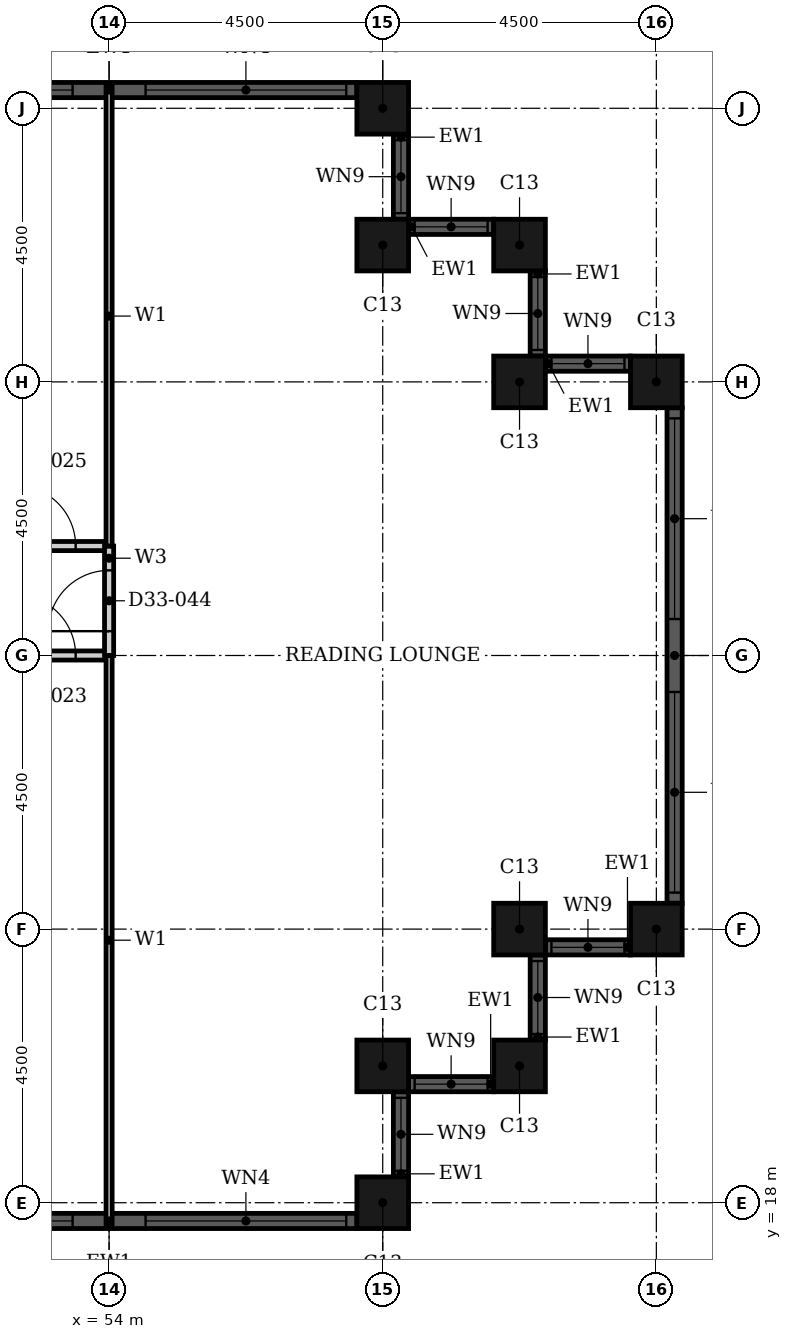
"""IFC4 building model, lengths in metres.
Left out: names, types, materials, properties, quantities, classifications, styles, units other than length and angle.
Written with IfcOpenShell. Run it as: python <this file> out.ifc"""

import sys

from ifc_helpers import new_model, si_unit, direction, frame, frame_2d, origin, origin_2d, place, context, subcontext, project, spatial, rectangle, hollow_rectangle, extrude, element, fill, save


model = new_model("IFC4")
c1 = context("Model", 3, precision=1e-05, world=origin(), true_north=direction((0.0, 1.0)))
c2 = subcontext(c1, "Body", "Model", "MODEL_VIEW")
j1 = project(units=[si_unit("LENGTHUNIT", "METRE"), si_unit("PLANEANGLEUNIT", "RADIAN")], contexts=[c1])
p1 = place(None, origin())
s1 = spatial("IfcSite", under=j1, at=p1, CompositionType="ELEMENT")
p2 = place(p1, origin())
s2 = spatial("IfcBuilding", under=s1, at=p2, CompositionType="ELEMENT")
p3 = place(p2, frame((0.0, 0.0, 133.2)))
s3 = spatial("IfcBuildingStorey", under=s2, at=p3, CompositionType="ELEMENT", Elevation=133.2)
for number, where, z_axis, x_axis in (
    (1, (58.5, 18.0, 0.0), (0.0, 0.0, 1.0), (1.0, 0.0, 0.0)),
    (2, (58.5, 20.25, 0.0), (0.0, 0.0, 1.0), (1.0, 0.0, 0.0)),
    (3, (60.75, 20.25, 0.0), (0.0, 0.0, 1.0), (1.0, 0.0, 0.0)),
    (4, (60.75, 22.5, 0.0), (0.0, 0.0, 1.0), (1.0, 0.0, 0.0)),
    (5, (63.0, 22.5, 0.0), (0.0, 0.0, 1.0), (1.0, 0.0, 0.0)),
    (6, (63.0, 31.5, 0.0), (0.0, 0.0, 1.0), (1.0, 0.0, 0.0)),
    (7, (60.75, 31.5, 0.0), (0.0, 0.0, 1.0), (1.0, 0.0, 0.0)),
    (8, (60.75, 33.75, 0.0), (0.0, 0.0, 1.0), (1.0, 0.0, 0.0)),
    (9, (58.5, 33.75, 0.0), (0.0, 0.0, 1.0), (1.0, 0.0, 0.0)),
    (10, (58.5, 36.0, 0.0), (0.0, 0.0, 1.0), (1.0, 0.0, 0.0)),
):
    element("IfcColumn", number, at=place(p3, frame(where, z_axis=z_axis, x_axis=x_axis)), inside=s3, PredefinedType="COLUMN", context=c2, shape_type="SweptSolid", body=[
        extrude(hollow_rectangle(XDim=0.85, YDim=0.85, WallThickness=0.026, at=origin_2d()), origin(), (0.0, 0.0, 1.0), 3.6),
    ])
p4 = place(p3, frame((49.925, 17.7, 0.0), z_axis=(0.0, 0.0, 1.0), x_axis=(1.0, 0.0, 0.0)))
e11 = element("IfcWall", 11, at=p4, inside=s3, PredefinedType="SOLIDWALL", context=c2, shape_type="SweptSolid", body=[
    extrude(rectangle(XDim=8.15, YDim=0.25, at=frame_2d((4.075, 0.0))), origin(), (0.0, 0.0, 1.0), 3.6),
])
p5 = place(p4, frame((0.175, 0.0, 0.9)))
e12 = element("IfcOpeningElement", 12, at=p5, cuts=e11, PredefinedType="OPENING", context=c2, shape_type="SweptSolid", body=[
    extrude(rectangle(XDim=3.3, YDim=2.08, at=frame_2d((1.65, 1.04))), frame((0.0, 0.135, 0.0), z_axis=(0.0, -1.0, 0.0), x_axis=(1.0, 0.0, 0.0)), (0.0, 0.0, 1.0), 0.27),
])
p6 = place(p4, frame((4.675, 0.0, 0.9)))
e13 = element("IfcOpeningElement", 13, at=p6, cuts=e11, PredefinedType="OPENING", context=c2, shape_type="SweptSolid", body=[
    extrude(rectangle(XDim=3.3, YDim=2.08, at=frame_2d((1.65, 1.04))), frame((0.0, 0.135, 0.0), z_axis=(0.0, -1.0, 0.0), x_axis=(1.0, 0.0, 0.0)), (0.0, 0.0, 1.0), 0.27),
])
p7 = place(p3, frame((58.8, 18.425, 0.0), z_axis=(0.0, 0.0, 1.0), x_axis=(0.0, 1.0, 0.0)))
e14 = element("IfcWall", 14, at=p7, inside=s3, PredefinedType="SOLIDWALL", context=c2, shape_type="SweptSolid", body=[
    extrude(rectangle(XDim=1.4, YDim=0.25, at=frame_2d((0.7, 0.0))), origin(), (0.0, 0.0, 1.0), 3.6),
])
p8 = place(p7, frame((0.1, 0.0, 0.9)))
e15 = element("IfcOpeningElement", 15, at=p8, cuts=e14, PredefinedType="OPENING", context=c2, shape_type="SweptSolid", body=[
    extrude(rectangle(XDim=1.2, YDim=2.08, at=frame_2d((0.6, 1.04))), frame((0.0, 0.135, 0.0), z_axis=(0.0, -1.0, 0.0), x_axis=(1.0, 0.0, 0.0)), (0.0, 0.0, 1.0), 0.27),
])
p9 = place(p3, frame((58.925, 19.95, 0.0), z_axis=(0.0, 0.0, 1.0), x_axis=(1.0, 0.0, 0.0)))
e16 = element("IfcWall", 16, at=p9, inside=s3, PredefinedType="SOLIDWALL", context=c2, shape_type="SweptSolid", body=[
    extrude(rectangle(XDim=1.4, YDim=0.25, at=frame_2d((0.7, 0.0))), origin(), (0.0, 0.0, 1.0), 3.6),
])
p10 = place(p9, frame((0.1, 0.0, 0.9)))
e17 = element("IfcOpeningElement", 17, at=p10, cuts=e16, PredefinedType="OPENING", context=c2, shape_type="SweptSolid", body=[
    extrude(rectangle(XDim=1.2, YDim=2.08, at=frame_2d((0.6, 1.04))), frame((0.0, 0.135, 0.0), z_axis=(0.0, -1.0, 0.0), x_axis=(1.0, 0.0, 0.0)), (0.0, 0.0, 1.0), 0.27),
])
p11 = place(p3, frame((61.05, 20.675, 0.0), z_axis=(0.0, 0.0, 1.0), x_axis=(0.0, 1.0, 0.0)))
e18 = element("IfcWall", 18, at=p11, inside=s3, PredefinedType="SOLIDWALL", context=c2, shape_type="SweptSolid", body=[
    extrude(rectangle(XDim=1.4, YDim=0.25, at=frame_2d((0.7, 0.0))), origin(), (0.0, 0.0, 1.0), 3.6),
])
p12 = place(p11, frame((0.1, 0.0, 0.9)))
e19 = element("IfcOpeningElement", 19, at=p12, cuts=e18, PredefinedType="OPENING", context=c2, shape_type="SweptSolid", body=[
    extrude(rectangle(XDim=1.2, YDim=2.08, at=frame_2d((0.6, 1.04))), frame((0.0, 0.135, 0.0), z_axis=(0.0, -1.0, 0.0), x_axis=(1.0, 0.0, 0.0)), (0.0, 0.0, 1.0), 0.27),
])
p13 = place(p3, frame((61.175, 22.2, 0.0), z_axis=(0.0, 0.0, 1.0), x_axis=(1.0, 0.0, 0.0)))
e20 = element("IfcWall", 20, at=p13, inside=s3, PredefinedType="SOLIDWALL", context=c2, shape_type="SweptSolid", body=[
    extrude(rectangle(XDim=1.4, YDim=0.25, at=frame_2d((0.7, 0.0))), origin(), (0.0, 0.0, 1.0), 3.6),
])
p14 = place(p13, frame((0.1, 0.0, 0.9)))
e21 = element("IfcOpeningElement", 21, at=p14, cuts=e20, PredefinedType="OPENING", context=c2, shape_type="SweptSolid", body=[
    extrude(rectangle(XDim=1.2, YDim=2.08, at=frame_2d((0.6, 1.04))), frame((0.0, 0.135, 0.0), z_axis=(0.0, -1.0, 0.0), x_axis=(1.0, 0.0, 0.0)), (0.0, 0.0, 1.0), 0.27),
])
p15 = place(p3, frame((63.3, 22.925, 0.0), z_axis=(0.0, 0.0, 1.0), x_axis=(0.0, 1.0, 0.0)))
e22 = element("IfcWall", 22, at=p15, inside=s3, PredefinedType="SOLIDWALL", context=c2, shape_type="SweptSolid", body=[
    extrude(rectangle(XDim=8.15, YDim=0.25, at=frame_2d((4.075, 0.0))), origin(), (0.0, 0.0, 1.0), 3.6),
])
p16 = place(p15, frame((0.175, 0.0, 0.9)))
e23 = element("IfcOpeningElement", 23, at=p16, cuts=e22, PredefinedType="OPENING", context=c2, shape_type="SweptSolid", body=[
    extrude(rectangle(XDim=3.3, YDim=2.08, at=frame_2d((1.65, 1.04))), frame((0.0, 0.135, 0.0), z_axis=(0.0, -1.0, 0.0), x_axis=(1.0, 0.0, 0.0)), (0.0, 0.0, 1.0), 0.27),
])
p17 = place(p15, frame((4.675, 0.0, 0.9)))
e24 = element("IfcOpeningElement", 24, at=p17, cuts=e22, PredefinedType="OPENING", context=c2, shape_type="SweptSolid", body=[
    extrude(rectangle(XDim=3.3, YDim=2.08, at=frame_2d((1.65, 1.04))), frame((0.0, 0.135, 0.0), z_axis=(0.0, -1.0, 0.0), x_axis=(1.0, 0.0, 0.0)), (0.0, 0.0, 1.0), 0.27),
])
p18 = place(p3, frame((62.575, 31.8, 0.0), z_axis=(0.0, 0.0, 1.0), x_axis=(-1.0, 0.0, 0.0)))
e25 = element("IfcWall", 25, at=p18, inside=s3, PredefinedType="SOLIDWALL", context=c2, shape_type="SweptSolid", body=[
    extrude(rectangle(XDim=1.4, YDim=0.25, at=frame_2d((0.7, 0.0))), origin(), (0.0, 0.0, 1.0), 3.6),
])
p19 = place(p18, frame((0.1, 0.0, 0.9)))
e26 = element("IfcOpeningElement", 26, at=p19, cuts=e25, PredefinedType="OPENING", context=c2, shape_type="SweptSolid", body=[
    extrude(rectangle(XDim=1.2, YDim=2.08, at=frame_2d((0.6, 1.04))), frame((0.0, 0.135, 0.0), z_axis=(0.0, -1.0, 0.0), x_axis=(1.0, 0.0, 0.0)), (0.0, 0.0, 1.0), 0.27),
])
p20 = place(p3, frame((61.05, 31.925, 0.0), z_axis=(0.0, 0.0, 1.0), x_axis=(0.0, 1.0, 0.0)))
e27 = element("IfcWall", 27, at=p20, inside=s3, PredefinedType="SOLIDWALL", context=c2, shape_type="SweptSolid", body=[
    extrude(rectangle(XDim=1.4, YDim=0.25, at=frame_2d((0.7, 0.0))), origin(), (0.0, 0.0, 1.0), 3.6),
])
p21 = place(p20, frame((0.1, 0.0, 0.9)))
e28 = element("IfcOpeningElement", 28, at=p21, cuts=e27, PredefinedType="OPENING", context=c2, shape_type="SweptSolid", body=[
    extrude(rectangle(XDim=1.2, YDim=2.08, at=frame_2d((0.6, 1.04))), frame((0.0, 0.135, 0.0), z_axis=(0.0, -1.0, 0.0), x_axis=(1.0, 0.0, 0.0)), (0.0, 0.0, 1.0), 0.27),
])
p22 = place(p3, frame((60.325, 34.05, 0.0), z_axis=(0.0, 0.0, 1.0), x_axis=(-1.0, 0.0, 0.0)))
e29 = element("IfcWall", 29, at=p22, inside=s3, PredefinedType="SOLIDWALL", context=c2, shape_type="SweptSolid", body=[
    extrude(rectangle(XDim=1.4, YDim=0.25, at=frame_2d((0.7, 0.0))), origin(), (0.0, 0.0, 1.0), 3.6),
])
p23 = place(p22, frame((0.1, 0.0, 0.9)))
e30 = element("IfcOpeningElement", 30, at=p23, cuts=e29, PredefinedType="OPENING", context=c2, shape_type="SweptSolid", body=[
    extrude(rectangle(XDim=1.2, YDim=2.08, at=frame_2d((0.6, 1.04))), frame((0.0, 0.135, 0.0), z_axis=(0.0, -1.0, 0.0), x_axis=(1.0, 0.0, 0.0)), (0.0, 0.0, 1.0), 0.27),
])
p24 = place(p3, frame((58.8, 34.175, 0.0), z_axis=(0.0, 0.0, 1.0), x_axis=(0.0, 1.0, 0.0)))
e31 = element("IfcWall", 31, at=p24, inside=s3, PredefinedType="SOLIDWALL", context=c2, shape_type="SweptSolid", body=[
    extrude(rectangle(XDim=1.4, YDim=0.25, at=frame_2d((0.7, 0.0))), origin(), (0.0, 0.0, 1.0), 3.6),
])
p25 = place(p24, frame((0.1, 0.0, 0.9)))
e32 = element("IfcOpeningElement", 32, at=p25, cuts=e31, PredefinedType="OPENING", context=c2, shape_type="SweptSolid", body=[
    extrude(rectangle(XDim=1.2, YDim=2.08, at=frame_2d((0.6, 1.04))), frame((0.0, 0.135, 0.0), z_axis=(0.0, -1.0, 0.0), x_axis=(1.0, 0.0, 0.0)), (0.0, 0.0, 1.0), 0.27),
])
p26 = place(p3, frame((58.075, 36.3, 0.0), z_axis=(0.0, 0.0, 1.0), x_axis=(-1.0, 0.0, 0.0)))
e33 = element("IfcWall", 33, at=p26, inside=s3, PredefinedType="SOLIDWALL", context=c2, shape_type="SweptSolid", body=[
    extrude(rectangle(XDim=8.15, YDim=0.25, at=frame_2d((4.075, 0.0))), origin(), (0.0, 0.0, 1.0), 3.6),
])
p27 = place(p26, frame((0.175, 0.0, 0.9)))
e34 = element("IfcOpeningElement", 34, at=p27, cuts=e33, PredefinedType="OPENING", context=c2, shape_type="SweptSolid", body=[
    extrude(rectangle(XDim=3.3, YDim=2.08, at=frame_2d((1.65, 1.04))), frame((0.0, 0.135, 0.0), z_axis=(0.0, -1.0, 0.0), x_axis=(1.0, 0.0, 0.0)), (0.0, 0.0, 1.0), 0.27),
])
p28 = place(p26, frame((4.675, 0.0, 0.9)))
e35 = element("IfcOpeningElement", 35, at=p28, cuts=e33, PredefinedType="OPENING", context=c2, shape_type="SweptSolid", body=[
    extrude(rectangle(XDim=3.3, YDim=2.08, at=frame_2d((1.65, 1.04))), frame((0.0, 0.135, 0.0), z_axis=(0.0, -1.0, 0.0), x_axis=(1.0, 0.0, 0.0)), (0.0, 0.0, 1.0), 0.27),
])
p29 = place(p3, frame((46.8, 27.0, 0.0), z_axis=(0.0, 0.0, 1.0), x_axis=(1.0, 0.0, 0.0)))
e36 = element("IfcWall", 36, at=p29, inside=s3, PredefinedType="PARTITIONING", context=c2, shape_type="SweptSolid", body=[
    extrude(rectangle(XDim=7.2, YDim=0.15, at=frame_2d((3.6, 0.0))), origin(), (0.0, 0.0, 1.0), 2.58),
])
p30 = place(p29, frame((5.65, 0.0, 0.0)))
e37 = element("IfcOpeningElement", 37, at=p30, cuts=e36, PredefinedType="OPENING", context=c2, shape_type="SweptSolid", body=[
    extrude(rectangle(XDim=1.0, YDim=2.1, at=frame_2d((0.5, 1.05))), frame((0.0, 0.085, 0.0), z_axis=(0.0, -1.0, 0.0), x_axis=(1.0, 0.0, 0.0)), (0.0, 0.0, 1.0), 0.17),
])
p31 = place(p3, frame((46.8, 28.8, 0.0), z_axis=(0.0, 0.0, 1.0), x_axis=(1.0, 0.0, 0.0)))
e38 = element("IfcWall", 38, at=p31, inside=s3, PredefinedType="PARTITIONING", context=c2, shape_type="SweptSolid", body=[
    extrude(rectangle(XDim=7.2, YDim=0.15, at=frame_2d((3.6, 0.0))), origin(), (0.0, 0.0, 1.0), 3.3),
])
p32 = place(p31, frame((5.65, 0.0, 0.0)))
e39 = element("IfcOpeningElement", 39, at=p32, cuts=e38, PredefinedType="OPENING", context=c2, shape_type="SweptSolid", body=[
    extrude(rectangle(XDim=1.0, YDim=2.1, at=frame_2d((0.5, 1.05))), frame((0.0, 0.085, 0.0), z_axis=(0.0, -1.0, 0.0), x_axis=(1.0, 0.0, 0.0)), (0.0, 0.0, 1.0), 0.17),
])
p33 = place(p3, frame((54.0, 27.0, 0.0), z_axis=(0.0, 0.0, 1.0), x_axis=(0.0, 1.0, 0.0)))
e40 = element("IfcWall", 40, at=p33, inside=s3, PredefinedType="PARTITIONING", context=c2, shape_type="SweptSolid", body=[
    extrude(rectangle(XDim=1.8, YDim=0.15, at=frame_2d((0.9, 0.0))), origin(), (0.0, 0.0, 1.0), 3.3),
])
p34 = place(p33, frame((0.4, 0.0, 0.0)))
e41 = element("IfcOpeningElement", 41, at=p34, cuts=e40, PredefinedType="OPENING", context=c2, shape_type="SweptSolid", body=[
    extrude(rectangle(XDim=1.0, YDim=2.1, at=frame_2d((0.5, 1.05))), frame((0.0, 0.085, 0.0), z_axis=(0.0, -1.0, 0.0), x_axis=(1.0, 0.0, 0.0)), (0.0, 0.0, 1.0), 0.17),
])
p35 = place(p3, frame((54.0, 28.8, 0.0), z_axis=(0.0, 0.0, 1.0), x_axis=(0.0, 1.0, 0.0)))
e42 = element("IfcWall", 42, at=p35, inside=s3, PredefinedType="PARTITIONING", context=c2, shape_type="SweptSolid", body=[
    extrude(rectangle(XDim=7.565, YDim=0.1, at=frame_2d((3.782, 0.0))), origin(), (0.0, 0.0, 1.0), 3.3),
])
p36 = place(p3, frame((54.0, 17.635, 0.0), z_axis=(0.0, 0.0, 1.0), x_axis=(0.0, 1.0, 0.0)))
e43 = element("IfcWall", 43, at=p36, inside=s3, PredefinedType="PARTITIONING", context=c2, shape_type="SweptSolid", body=[
    extrude(rectangle(XDim=9.365, YDim=0.1, at=frame_2d((4.683, 0.0))), origin(), (0.0, 0.0, 1.0), 3.3),
])
p37 = place(p5, origin())
e44 = element("IfcWindow", 44, at=p37, inside=s3, PartitioningType="SINGLE_PANEL", PredefinedType="WINDOW", context=c2, shape_type="SweptSolid", body=[
    extrude(rectangle(XDim=3.3, YDim=2.08, at=frame_2d((1.65, 1.04))), frame((0.0, 0.03, 0.0), z_axis=(0.0, -1.0, 0.0), x_axis=(1.0, 0.0, 0.0)), (0.0, 0.0, 1.0), 0.06),
])
fill(e12, e44)
p38 = place(p6, origin())
e45 = element("IfcWindow", 45, at=p38, inside=s3, PartitioningType="SINGLE_PANEL", PredefinedType="WINDOW", context=c2, shape_type="SweptSolid", body=[
    extrude(rectangle(XDim=3.3, YDim=2.08, at=frame_2d((1.65, 1.04))), frame((0.0, 0.03, 0.0), z_axis=(0.0, -1.0, 0.0), x_axis=(1.0, 0.0, 0.0)), (0.0, 0.0, 1.0), 0.06),
])
fill(e13, e45)
p39 = place(p8, origin())
e46 = element("IfcWindow", 46, at=p39, inside=s3, PartitioningType="SINGLE_PANEL", PredefinedType="WINDOW", context=c2, shape_type="SweptSolid", body=[
    extrude(rectangle(XDim=1.2, YDim=2.08, at=frame_2d((0.6, 1.04))), frame((0.0, 0.03, 0.0), z_axis=(0.0, -1.0, 0.0), x_axis=(1.0, 0.0, 0.0)), (0.0, 0.0, 1.0), 0.06),
])
fill(e15, e46)
p40 = place(p10, origin())
e47 = element("IfcWindow", 47, at=p40, inside=s3, PartitioningType="SINGLE_PANEL", PredefinedType="WINDOW", context=c2, shape_type="SweptSolid", body=[
    extrude(rectangle(XDim=1.2, YDim=2.08, at=frame_2d((0.6, 1.04))), frame((0.0, 0.03, 0.0), z_axis=(0.0, -1.0, 0.0), x_axis=(1.0, 0.0, 0.0)), (0.0, 0.0, 1.0), 0.06),
])
fill(e17, e47)
p41 = place(p12, origin())
e48 = element("IfcWindow", 48, at=p41, inside=s3, PartitioningType="SINGLE_PANEL", PredefinedType="WINDOW", context=c2, shape_type="SweptSolid", body=[
    extrude(rectangle(XDim=1.2, YDim=2.08, at=frame_2d((0.6, 1.04))), frame((0.0, 0.03, 0.0), z_axis=(0.0, -1.0, 0.0), x_axis=(1.0, 0.0, 0.0)), (0.0, 0.0, 1.0), 0.06),
])
fill(e19, e48)
p42 = place(p14, origin())
e49 = element("IfcWindow", 49, at=p42, inside=s3, PartitioningType="SINGLE_PANEL", PredefinedType="WINDOW", context=c2, shape_type="SweptSolid", body=[
    extrude(rectangle(XDim=1.2, YDim=2.08, at=frame_2d((0.6, 1.04))), frame((0.0, 0.03, 0.0), z_axis=(0.0, -1.0, 0.0), x_axis=(1.0, 0.0, 0.0)), (0.0, 0.0, 1.0), 0.06),
])
fill(e21, e49)
p43 = place(p16, origin())
e50 = element("IfcWindow", 50, at=p43, inside=s3, PartitioningType="SINGLE_PANEL", PredefinedType="WINDOW", context=c2, shape_type="SweptSolid", body=[
    extrude(rectangle(XDim=3.3, YDim=2.08, at=frame_2d((1.65, 1.04))), frame((0.0, 0.03, 0.0), z_axis=(0.0, -1.0, 0.0), x_axis=(1.0, 0.0, 0.0)), (0.0, 0.0, 1.0), 0.06),
])
fill(e23, e50)
p44 = place(p17, origin())
e51 = element("IfcWindow", 51, at=p44, inside=s3, PartitioningType="SINGLE_PANEL", PredefinedType="WINDOW", context=c2, shape_type="SweptSolid", body=[
    extrude(rectangle(XDim=3.3, YDim=2.08, at=frame_2d((1.65, 1.04))), frame((0.0, 0.03, 0.0), z_axis=(0.0, -1.0, 0.0), x_axis=(1.0, 0.0, 0.0)), (0.0, 0.0, 1.0), 0.06),
])
fill(e24, e51)
p45 = place(p19, origin())
e52 = element("IfcWindow", 52, at=p45, inside=s3, PartitioningType="SINGLE_PANEL", PredefinedType="WINDOW", context=c2, shape_type="SweptSolid", body=[
    extrude(rectangle(XDim=1.2, YDim=2.08, at=frame_2d((0.6, 1.04))), frame((0.0, 0.03, 0.0), z_axis=(0.0, -1.0, 0.0), x_axis=(1.0, 0.0, 0.0)), (0.0, 0.0, 1.0), 0.06),
])
fill(e26, e52)
p46 = place(p21, origin())
e53 = element("IfcWindow", 53, at=p46, inside=s3, PartitioningType="SINGLE_PANEL", PredefinedType="WINDOW", context=c2, shape_type="SweptSolid", body=[
    extrude(rectangle(XDim=1.2, YDim=2.08, at=frame_2d((0.6, 1.04))), frame((0.0, 0.03, 0.0), z_axis=(0.0, -1.0, 0.0), x_axis=(1.0, 0.0, 0.0)), (0.0, 0.0, 1.0), 0.06),
])
fill(e28, e53)
p47 = place(p23, origin())
e54 = element("IfcWindow", 54, at=p47, inside=s3, PartitioningType="SINGLE_PANEL", PredefinedType="WINDOW", context=c2, shape_type="SweptSolid", body=[
    extrude(rectangle(XDim=1.2, YDim=2.08, at=frame_2d((0.6, 1.04))), frame((0.0, 0.03, 0.0), z_axis=(0.0, -1.0, 0.0), x_axis=(1.0, 0.0, 0.0)), (0.0, 0.0, 1.0), 0.06),
])
fill(e30, e54)
p48 = place(p25, origin())
e55 = element("IfcWindow", 55, at=p48, inside=s3, PartitioningType="SINGLE_PANEL", PredefinedType="WINDOW", context=c2, shape_type="SweptSolid", body=[
    extrude(rectangle(XDim=1.2, YDim=2.08, at=frame_2d((0.6, 1.04))), frame((0.0, 0.03, 0.0), z_axis=(0.0, -1.0, 0.0), x_axis=(1.0, 0.0, 0.0)), (0.0, 0.0, 1.0), 0.06),
])
fill(e32, e55)
p49 = place(p27, origin())
e56 = element("IfcWindow", 56, at=p49, inside=s3, PartitioningType="SINGLE_PANEL", PredefinedType="WINDOW", context=c2, shape_type="SweptSolid", body=[
    extrude(rectangle(XDim=3.3, YDim=2.08, at=frame_2d((1.65, 1.04))), frame((0.0, 0.03, 0.0), z_axis=(0.0, -1.0, 0.0), x_axis=(1.0, 0.0, 0.0)), (0.0, 0.0, 1.0), 0.06),
])
fill(e34, e56)
p50 = place(p28, origin())
e57 = element("IfcWindow", 57, at=p50, inside=s3, PartitioningType="SINGLE_PANEL", PredefinedType="WINDOW", context=c2, shape_type="SweptSolid", body=[
    extrude(rectangle(XDim=3.3, YDim=2.08, at=frame_2d((1.65, 1.04))), frame((0.0, 0.03, 0.0), z_axis=(0.0, -1.0, 0.0), x_axis=(1.0, 0.0, 0.0)), (0.0, 0.0, 1.0), 0.06),
])
fill(e35, e57)
p51 = place(p30, origin())
e58 = element("IfcDoor", 58, at=p51, inside=s3, OperationType="SINGLE_SWING_RIGHT", PredefinedType="DOOR", context=c2, shape_type="SweptSolid", body=[
    extrude(rectangle(XDim=1.0, YDim=2.1, at=frame_2d((0.5, 1.05))), frame((0.0, 0.025, 0.0), z_axis=(0.0, -1.0, 0.0), x_axis=(1.0, 0.0, 0.0)), (0.0, 0.0, 1.0), 0.05),
])
fill(e37, e58)
p52 = place(p32, origin())
e59 = element("IfcDoor", 59, at=p52, inside=s3, OperationType="SINGLE_SWING_RIGHT", PredefinedType="DOOR", context=c2, shape_type="SweptSolid", body=[
    extrude(rectangle(XDim=1.0, YDim=2.1, at=frame_2d((0.5, 1.05))), frame((0.0, 0.025, 0.0), z_axis=(0.0, -1.0, 0.0), x_axis=(1.0, 0.0, 0.0)), (0.0, 0.0, 1.0), 0.05),
])
fill(e39, e59)
p53 = place(p34, origin())
e60 = element("IfcDoor", 60, at=p53, inside=s3, OperationType="SINGLE_SWING_RIGHT", PredefinedType="DOOR", context=c2, shape_type="SweptSolid", body=[
    extrude(rectangle(XDim=1.0, YDim=2.1, at=frame_2d((0.5, 1.05))), frame((0.0, 0.025, 0.0), z_axis=(0.0, -1.0, 0.0), x_axis=(1.0, 0.0, 0.0)), (0.0, 0.0, 1.0), 0.05),
])
fill(e41, e60)
save(model, sys.argv[1])
